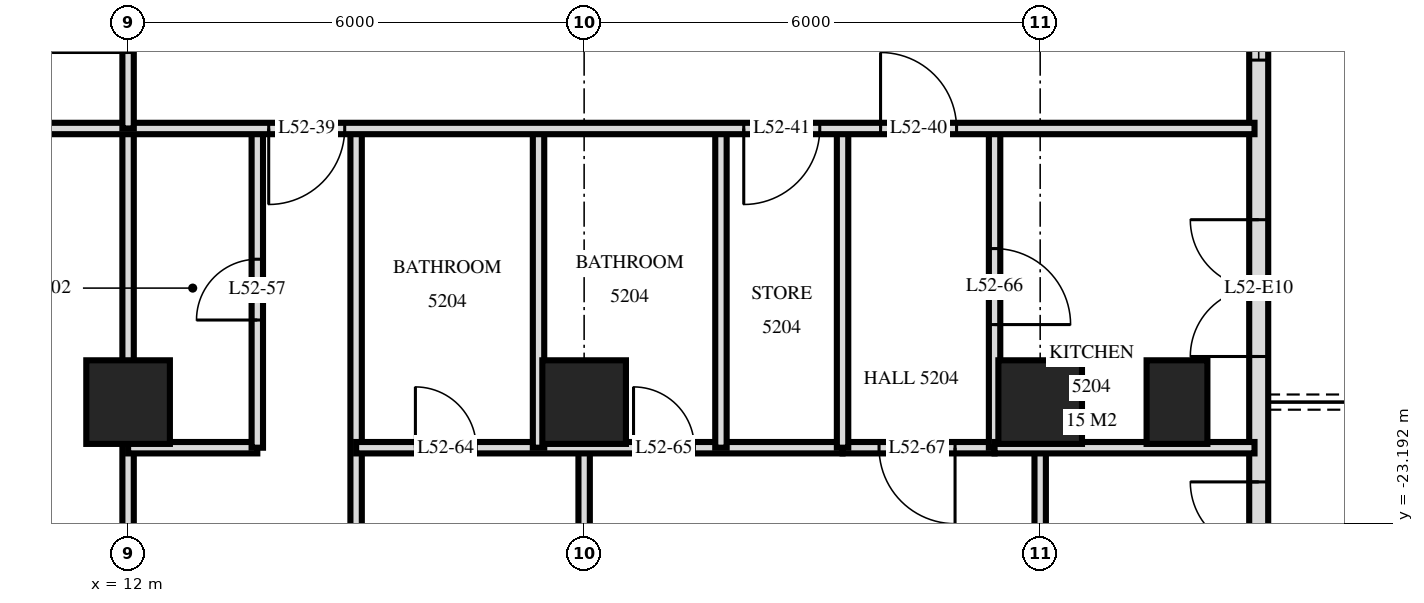
"""IFC4 building model, lengths in metres.
Left out: names, types, materials, properties, quantities, classifications, styles, units other than length and angle.
Written with IfcOpenShell. Run it as: python <this file> out.ifc"""

import sys

from ifc_helpers import new_model, si_unit, direction, frame, frame_2d, origin, origin_2d, place, context, subcontext, project, spatial, rectangle, extrude, element, fill, save


model = new_model("IFC4")
c1 = context("Model", 3, precision=1e-05, world=origin(), true_north=direction((0.0, 1.0)))
c2 = subcontext(c1, "Body", "Model", "MODEL_VIEW")
j1 = project(units=[si_unit("LENGTHUNIT", "METRE"), si_unit("PLANEANGLEUNIT", "RADIAN")], contexts=[c1])
p1 = place(None, origin())
s1 = spatial("IfcSite", under=j1, at=p1, CompositionType="ELEMENT")
p2 = place(p1, origin())
s2 = spatial("IfcBuilding", under=s1, at=p2, CompositionType="ELEMENT")
p3 = place(p2, frame((0.0, 0.0, 201.1)))
s3 = spatial("IfcBuildingStorey", under=s2, at=p3, CompositionType="ELEMENT", Elevation=201.1)
for number, where, z_axis, x_axis in (
    (1, (12.0, -21.6, 0.0), (0.0, 0.0, 1.0), (1.0, 0.0, 0.0)),
    (2, (18.0, -21.6, 0.0), (0.0, 0.0, 1.0), (1.0, 0.0, 0.0)),
    (3, (24.0, -21.6, 0.0), (0.0, 0.0, 1.0), (1.0, 0.0, 0.0)),
):
    element("IfcColumn", number, at=place(p3, frame(where, z_axis=z_axis, x_axis=x_axis)), inside=s3, PredefinedType="COLUMN", context=c2, shape_type="SweptSolid", body=[
        extrude(rectangle(XDim=1.1, YDim=1.1, at=origin_2d()), origin(), (0.0, 0.0, 1.0), 3.5),
    ])
p4 = place(p3, frame((25.8, -21.6, 0.0), z_axis=(0.0, 0.0, 1.0), x_axis=(0.0, 1.0, 0.0)))
e4 = element("IfcColumn", 4, at=p4, inside=s3, PredefinedType="COLUMN", context=c2, shape_type="SweptSolid", body=[
    extrude(rectangle(XDim=1.1, YDim=0.8, at=origin_2d()), origin(), (0.0, 0.0, 1.0), 3.5),
])
p5 = place(p3, frame((26.875, -24.875, 0.0), z_axis=(0.0, 0.0, 1.0), x_axis=(0.0, 1.0, 0.0)))
e5 = element("IfcWall", 5, at=p5, inside=s3, PredefinedType="SOLIDWALL", context=c2, shape_type="SweptSolid", body=[
    extrude(rectangle(XDim=21.551, YDim=0.25, at=frame_2d((10.775, 0.0))), origin(), (0.0, 0.0, 1.0), 3.22),
])
p6 = place(p5, frame((0.425, 0.0, 0.0)))
e6 = element("IfcOpeningElement", 6, at=p6, cuts=e5, PredefinedType="OPENING", context=c2, shape_type="SweptSolid", body=[
    extrude(rectangle(XDim=1.8, YDim=2.4, at=frame_2d((0.9, 1.2))), frame((0.0, 0.135, 0.0), z_axis=(0.0, -1.0, 0.0), x_axis=(1.0, 0.0, 0.0)), (0.0, 0.0, 1.0), 0.27),
])
p7 = place(p5, frame((3.875, 0.0, 0.0)))
e7 = element("IfcOpeningElement", 7, at=p7, cuts=e5, PredefinedType="OPENING", context=c2, shape_type="SweptSolid", body=[
    extrude(rectangle(XDim=1.8, YDim=2.4, at=frame_2d((0.9, 1.2))), frame((0.0, 0.135, 0.0), z_axis=(0.0, -1.0, 0.0), x_axis=(1.0, 0.0, 0.0)), (0.0, 0.0, 1.0), 0.27),
])
p8 = place(p5, frame((7.775, 0.0, 0.9)))
e8 = element("IfcOpeningElement", 8, at=p8, cuts=e5, PredefinedType="OPENING", context=c2, shape_type="SweptSolid", body=[
    extrude(rectangle(XDim=1.2, YDim=1.5, at=frame_2d((0.6, 0.75))), frame((0.0, 0.135, 0.0), z_axis=(0.0, -1.0, 0.0), x_axis=(1.0, 0.0, 0.0)), (0.0, 0.0, 1.0), 0.27),
])
p9 = place(p5, frame((11.975, 0.0, 0.0)))
e9 = element("IfcOpeningElement", 9, at=p9, cuts=e5, PredefinedType="OPENING", context=c2, shape_type="SweptSolid", body=[
    extrude(rectangle(XDim=1.8, YDim=2.4, at=frame_2d((0.9, 1.2))), frame((0.0, 0.135, 0.0), z_axis=(0.0, -1.0, 0.0), x_axis=(1.0, 0.0, 0.0)), (0.0, 0.0, 1.0), 0.27),
])
p10 = place(p3, frame((24.0, -28.918, 0.0), z_axis=(0.0, 0.0, 1.0), x_axis=(0.0, 1.0, 0.0)))
e10 = element("IfcWall", 10, at=p10, inside=s3, PredefinedType="PARTITIONING", context=c2, shape_type="SweptSolid", body=[
    extrude(rectangle(XDim=6.718, YDim=0.15, at=frame_2d((3.359, 0.0))), origin(), (0.0, 0.0, 1.0), 3.22),
])
p11 = place(p10, frame((2.948, 0.0, 0.0)))
e11 = element("IfcOpeningElement", 11, at=p11, cuts=e10, PredefinedType="OPENING", context=c2, shape_type="SweptSolid", body=[
    extrude(rectangle(XDim=0.9, YDim=2.1, at=frame_2d((0.45, 1.05))), frame((0.0, 0.085, 0.0), z_axis=(0.0, -1.0, 0.0), x_axis=(1.0, 0.0, 0.0)), (0.0, 0.0, 1.0), 0.17),
])
p12 = place(p3, frame((23.4, -22.2, 0.0), z_axis=(0.0, 0.0, 1.0), x_axis=(0.0, 1.0, 0.0)))
e12 = element("IfcWall", 12, at=p12, inside=s3, PredefinedType="PARTITIONING", context=c2, shape_type="SweptSolid", body=[
    extrude(rectangle(XDim=4.2, YDim=0.15, at=frame_2d((2.1, 0.0))), origin(), (0.0, 0.0, 1.0), 3.22),
])
p13 = place(p12, frame((1.62, 0.0, 0.0)))
e13 = element("IfcOpeningElement", 13, at=p13, cuts=e12, PredefinedType="OPENING", context=c2, shape_type="SweptSolid", body=[
    extrude(rectangle(XDim=1.0, YDim=2.1, at=frame_2d((0.5, 1.05))), frame((0.0, 0.085, 0.0), z_axis=(0.0, -1.0, 0.0), x_axis=(1.0, 0.0, 0.0)), (0.0, 0.0, 1.0), 0.17),
])
for number, where, z_axis, x_axis in (
    (14, (21.4, -22.2, 0.0), (0.0, 0.0, 1.0), (0.0, 1.0, 0.0)),
    (15, (19.8, -22.2, 0.0), (0.0, 0.0, 1.0), (0.0, 1.0, 0.0)),
):
    element("IfcWall", number, at=place(p3, frame(where, z_axis=z_axis, x_axis=x_axis)), inside=s3, PredefinedType="PARTITIONING", context=c2, shape_type="SweptSolid", body=[
        extrude(rectangle(XDim=4.2, YDim=0.15, at=frame_2d((2.1, 0.0))), origin(), (0.0, 0.0, 1.0), 3.22),
    ])
p14 = place(p3, frame((18.0, -29.22, 0.0), z_axis=(0.0, 0.0, 1.0), x_axis=(0.0, 1.0, 0.0)))
e16 = element("IfcWall", 16, at=p14, inside=s3, PredefinedType="PARTITIONING", context=c2, shape_type="SweptSolid", body=[
    extrude(rectangle(XDim=7.02, YDim=0.15, at=frame_2d((3.51, 0.0))), origin(), (0.0, 0.0, 1.0), 3.22),
])
p15 = place(p14, frame((2.99, 0.0, 0.0)))
e17 = element("IfcOpeningElement", 17, at=p15, cuts=e16, PredefinedType="OPENING", context=c2, shape_type="SweptSolid", body=[
    extrude(rectangle(XDim=0.9, YDim=2.1, at=frame_2d((0.45, 1.05))), frame((0.0, 0.085, 0.0), z_axis=(0.0, -1.0, 0.0), x_axis=(1.0, 0.0, 0.0)), (0.0, 0.0, 1.0), 0.17),
])
p16 = place(p3, frame((17.4, -22.2, 0.0), z_axis=(0.0, 0.0, 1.0), x_axis=(0.0, 1.0, 0.0)))
e18 = element("IfcWall", 18, at=p16, inside=s3, PredefinedType="PARTITIONING", context=c2, shape_type="SweptSolid", body=[
    extrude(rectangle(XDim=4.2, YDim=0.15, at=frame_2d((2.1, 0.0))), origin(), (0.0, 0.0, 1.0), 3.22),
])
p17 = place(p3, frame((15.0, -29.22, 0.0), z_axis=(0.0, 0.0, 1.0), x_axis=(0.0, 1.0, 0.0)))
e19 = element("IfcWall", 19, at=p17, inside=s3, PredefinedType="PARTITIONING", context=c2, shape_type="SweptSolid", body=[
    extrude(rectangle(XDim=11.22, YDim=0.15, at=frame_2d((5.61, 0.0))), origin(), (0.0, 0.0, 1.0), 3.22),
])
p18 = place(p3, frame((13.7, -22.2, 0.0), z_axis=(0.0, 0.0, 1.0), x_axis=(0.0, 1.0, 0.0)))
e20 = element("IfcWall", 20, at=p18, inside=s3, PredefinedType="PARTITIONING", context=c2, shape_type="SweptSolid", body=[
    extrude(rectangle(XDim=4.2, YDim=0.15, at=frame_2d((2.1, 0.0))), origin(), (0.0, 0.0, 1.0), 3.22),
])
p19 = place(p18, frame((1.68, 0.0, 0.0)))
e21 = element("IfcOpeningElement", 21, at=p19, cuts=e20, PredefinedType="OPENING", context=c2, shape_type="SweptSolid", body=[
    extrude(rectangle(XDim=0.8, YDim=2.1, at=frame_2d((0.4, 1.05))), frame((0.0, 0.085, 0.0), z_axis=(0.0, -1.0, 0.0), x_axis=(1.0, 0.0, 0.0)), (0.0, 0.0, 1.0), 0.17),
])
p20 = place(p3, frame((12.0, -18.0, 0.0), z_axis=(0.0, 0.0, 1.0), x_axis=(0.0, 1.0, 0.0)))
e22 = element("IfcWall", 22, at=p20, inside=s3, PredefinedType="PARTITIONING", context=c2, shape_type="SweptSolid", body=[
    extrude(rectangle(XDim=2.95, YDim=0.15, at=frame_2d((1.475, 0.0))), origin(), (0.0, 0.0, 1.0), 3.22),
])
p21 = place(p20, frame((1.0, 0.0, 0.0)))
e23 = element("IfcOpeningElement", 23, at=p21, cuts=e22, PredefinedType="OPENING", context=c2, shape_type="SweptSolid", body=[
    extrude(rectangle(XDim=1.0, YDim=2.1, at=frame_2d((0.5, 1.05))), frame((0.0, 0.085, 0.0), z_axis=(0.0, -1.0, 0.0), x_axis=(1.0, 0.0, 0.0)), (0.0, 0.0, 1.0), 0.17),
])
p22 = place(p3, frame((12.0, -29.22, 0.0), z_axis=(0.0, 0.0, 1.0), x_axis=(0.0, 1.0, 0.0)))
e24 = element("IfcWall", 24, at=p22, inside=s3, PredefinedType="PARTITIONING", context=c2, shape_type="SweptSolid", body=[
    extrude(rectangle(XDim=11.22, YDim=0.15, at=frame_2d((5.61, 0.0))), origin(), (0.0, 0.0, 1.0), 3.22),
])
p23 = place(p3, frame((21.4, -22.2, 0.0), z_axis=(0.0, 0.0, 1.0), x_axis=(1.0, 0.0, 0.0)))
e25 = element("IfcWall", 25, at=p23, inside=s3, PredefinedType="PARTITIONING", context=c2, shape_type="SweptSolid", body=[
    extrude(rectangle(XDim=2.0, YDim=0.15, at=frame_2d((1.0, 0.0))), origin(), (0.0, 0.0, 1.0), 3.22),
])
p24 = place(p23, frame((0.48, 0.0, 0.0)))
e26 = element("IfcOpeningElement", 26, at=p24, cuts=e25, PredefinedType="OPENING", context=c2, shape_type="SweptSolid", body=[
    extrude(rectangle(XDim=1.0, YDim=2.1, at=frame_2d((0.5, 1.05))), frame((0.0, 0.085, 0.0), z_axis=(0.0, -1.0, 0.0), x_axis=(1.0, 0.0, 0.0)), (0.0, 0.0, 1.0), 0.17),
])
p25 = place(p3, frame((12.0, -22.2, 0.0), z_axis=(0.0, 0.0, 1.0), x_axis=(1.0, 0.0, 0.0)))
e27 = element("IfcWall", 27, at=p25, inside=s3, PredefinedType="PARTITIONING", context=c2, shape_type="SweptSolid", body=[
    extrude(rectangle(XDim=1.7, YDim=0.15, at=frame_2d((0.85, 0.0))), origin(), (0.0, 0.0, 1.0), 3.22),
])
p26 = place(p3, frame((15.0, -22.2, 0.0), z_axis=(0.0, 0.0, 1.0), x_axis=(1.0, 0.0, 0.0)))
e28 = element("IfcWall", 28, at=p26, inside=s3, PredefinedType="PARTITIONING", context=c2, shape_type="SweptSolid", body=[
    extrude(rectangle(XDim=6.4, YDim=0.15, at=frame_2d((3.2, 0.0))), origin(), (0.0, 0.0, 1.0), 3.22),
])
p27 = place(p26, frame((0.78, 0.0, 0.0)))
e29 = element("IfcOpeningElement", 29, at=p27, cuts=e28, PredefinedType="OPENING", context=c2, shape_type="SweptSolid", body=[
    extrude(rectangle(XDim=0.8, YDim=2.1, at=frame_2d((0.4, 1.05))), frame((0.0, 0.085, 0.0), z_axis=(0.0, -1.0, 0.0), x_axis=(1.0, 0.0, 0.0)), (0.0, 0.0, 1.0), 0.17),
])
p28 = place(p26, frame((3.65, 0.0, 0.0)))
e30 = element("IfcOpeningElement", 30, at=p28, cuts=e28, PredefinedType="OPENING", context=c2, shape_type="SweptSolid", body=[
    extrude(rectangle(XDim=0.8, YDim=2.1, at=frame_2d((0.4, 1.05))), frame((0.0, 0.085, 0.0), z_axis=(0.0, -1.0, 0.0), x_axis=(1.0, 0.0, 0.0)), (0.0, 0.0, 1.0), 0.17),
])
p29 = place(p3, frame((23.4, -22.2, 0.0), z_axis=(0.0, 0.0, 1.0), x_axis=(1.0, 0.0, 0.0)))
e31 = element("IfcWall", 31, at=p29, inside=s3, PredefinedType="PARTITIONING", context=c2, shape_type="SweptSolid", body=[
    extrude(rectangle(XDim=3.42, YDim=0.15, at=frame_2d((1.71, 0.0))), origin(), (0.0, 0.0, 1.0), 3.22),
])
p30 = place(p3, frame((-26.82, -18.0, 0.0), z_axis=(0.0, 0.0, 1.0), x_axis=(1.0, 0.0, 0.0)))
e32 = element("IfcWall", 32, at=p30, inside=s3, PredefinedType="PARTITIONING", context=c2, shape_type="SweptSolid", body=[
    extrude(rectangle(XDim=53.64, YDim=0.15, at=frame_2d((26.82, 0.0))), origin(), (0.0, 0.0, 1.0), 3.22),
])
p31 = place(p30, frame((11.97, 0.0, 0.0)))
e33 = element("IfcOpeningElement", 33, at=p31, cuts=e32, PredefinedType="OPENING", context=c2, shape_type="SweptSolid", body=[
    extrude(rectangle(XDim=1.0, YDim=2.1, at=frame_2d((0.5, 1.05))), frame((0.0, 0.085, 0.0), z_axis=(0.0, -1.0, 0.0), x_axis=(1.0, 0.0, 0.0)), (0.0, 0.0, 1.0), 0.17),
])
p32 = place(p30, frame((3.92, 0.0, 0.0)))
e34 = element("IfcOpeningElement", 34, at=p32, cuts=e32, PredefinedType="OPENING", context=c2, shape_type="SweptSolid", body=[
    extrude(rectangle(XDim=1.0, YDim=2.1, at=frame_2d((0.5, 1.05))), frame((0.0, 0.085, 0.0), z_axis=(0.0, -1.0, 0.0), x_axis=(1.0, 0.0, 0.0)), (0.0, 0.0, 1.0), 0.17),
])
p33 = place(p30, frame((5.72, 0.0, 0.0)))
e35 = element("IfcOpeningElement", 35, at=p33, cuts=e32, PredefinedType="OPENING", context=c2, shape_type="SweptSolid", body=[
    extrude(rectangle(XDim=1.0, YDim=2.1, at=frame_2d((0.5, 1.05))), frame((0.0, 0.085, 0.0), z_axis=(0.0, -1.0, 0.0), x_axis=(1.0, 0.0, 0.0)), (0.0, 0.0, 1.0), 0.17),
])
p34 = place(p30, frame((40.67, 0.0, 0.0)))
e36 = element("IfcOpeningElement", 36, at=p34, cuts=e32, PredefinedType="OPENING", context=c2, shape_type="SweptSolid", body=[
    extrude(rectangle(XDim=1.0, YDim=2.1, at=frame_2d((0.5, 1.05))), frame((0.0, 0.085, 0.0), z_axis=(0.0, -1.0, 0.0), x_axis=(1.0, 0.0, 0.0)), (0.0, 0.0, 1.0), 0.17),
])
p35 = place(p30, frame((48.72, 0.0, 0.0)))
e37 = element("IfcOpeningElement", 37, at=p35, cuts=e32, PredefinedType="OPENING", context=c2, shape_type="SweptSolid", body=[
    extrude(rectangle(XDim=1.0, YDim=2.1, at=frame_2d((0.5, 1.05))), frame((0.0, 0.085, 0.0), z_axis=(0.0, -1.0, 0.0), x_axis=(1.0, 0.0, 0.0)), (0.0, 0.0, 1.0), 0.17),
])
p36 = place(p30, frame((46.92, 0.0, 0.0)))
e38 = element("IfcOpeningElement", 38, at=p36, cuts=e32, PredefinedType="OPENING", context=c2, shape_type="SweptSolid", body=[
    extrude(rectangle(XDim=1.0, YDim=2.1, at=frame_2d((0.5, 1.05))), frame((0.0, 0.085, 0.0), z_axis=(0.0, -1.0, 0.0), x_axis=(1.0, 0.0, 0.0)), (0.0, 0.0, 1.0), 0.17),
])
p37 = place(p30, frame((17.32, 0.0, 0.0)))
e39 = element("IfcOpeningElement", 39, at=p37, cuts=e32, PredefinedType="OPENING", context=c2, shape_type="SweptSolid", body=[
    extrude(rectangle(XDim=1.0, YDim=2.1, at=frame_2d((0.5, 1.05))), frame((0.0, 0.085, 0.0), z_axis=(0.0, -1.0, 0.0), x_axis=(1.0, 0.0, 0.0)), (0.0, 0.0, 1.0), 0.17),
])
p38 = place(p30, frame((23.32, 0.0, 0.0)))
e40 = element("IfcOpeningElement", 40, at=p38, cuts=e32, PredefinedType="OPENING", context=c2, shape_type="SweptSolid", body=[
    extrude(rectangle(XDim=1.0, YDim=2.1, at=frame_2d((0.5, 1.05))), frame((0.0, 0.085, 0.0), z_axis=(0.0, -1.0, 0.0), x_axis=(1.0, 0.0, 0.0)), (0.0, 0.0, 1.0), 0.17),
])
p39 = place(p30, frame((29.32, 0.0, 0.0)))
e41 = element("IfcOpeningElement", 41, at=p39, cuts=e32, PredefinedType="OPENING", context=c2, shape_type="SweptSolid", body=[
    extrude(rectangle(XDim=1.0, YDim=2.1, at=frame_2d((0.5, 1.05))), frame((0.0, 0.085, 0.0), z_axis=(0.0, -1.0, 0.0), x_axis=(1.0, 0.0, 0.0)), (0.0, 0.0, 1.0), 0.17),
])
p40 = place(p30, frame((35.32, 0.0, 0.0)))
e42 = element("IfcOpeningElement", 42, at=p40, cuts=e32, PredefinedType="OPENING", context=c2, shape_type="SweptSolid", body=[
    extrude(rectangle(XDim=1.0, YDim=2.1, at=frame_2d((0.5, 1.05))), frame((0.0, 0.085, 0.0), z_axis=(0.0, -1.0, 0.0), x_axis=(1.0, 0.0, 0.0)), (0.0, 0.0, 1.0), 0.17),
])
p41 = place(p6, origin())
e43 = element("IfcDoor", 43, at=p41, inside=s3, OperationType="DOUBLE_DOOR_SINGLE_SWING", PredefinedType="DOOR", context=c2, shape_type="SweptSolid", body=[
    extrude(rectangle(XDim=1.8, YDim=2.4, at=frame_2d((0.9, 1.2))), frame((0.0, 0.025, 0.0), z_axis=(0.0, -1.0, 0.0), x_axis=(1.0, 0.0, 0.0)), (0.0, 0.0, 1.0), 0.05),
])
fill(e6, e43)
p42 = place(p7, origin())
e44 = element("IfcDoor", 44, at=p42, inside=s3, OperationType="DOUBLE_DOOR_SINGLE_SWING", PredefinedType="DOOR", context=c2, shape_type="SweptSolid", body=[
    extrude(rectangle(XDim=1.8, YDim=2.4, at=frame_2d((0.9, 1.2))), frame((0.0, 0.025, 0.0), z_axis=(0.0, -1.0, 0.0), x_axis=(1.0, 0.0, 0.0)), (0.0, 0.0, 1.0), 0.05),
])
fill(e7, e44)
p43 = place(p8, origin())
e45 = element("IfcWindow", 45, at=p43, inside=s3, PartitioningType="SINGLE_PANEL", PredefinedType="WINDOW", context=c2, shape_type="SweptSolid", body=[
    extrude(rectangle(XDim=1.2, YDim=1.5, at=frame_2d((0.6, 0.75))), frame((0.0, 0.03, 0.0), z_axis=(0.0, -1.0, 0.0), x_axis=(1.0, 0.0, 0.0)), (0.0, 0.0, 1.0), 0.06),
])
fill(e8, e45)
p44 = place(p34, frame((0.5, 0.0, 0.0), z_axis=(0.0, 0.0, 1.0), x_axis=(-1.0, 0.0, 0.0)))
e46 = element("IfcDoor", 46, at=p44, inside=s3, OperationType="SINGLE_SWING_LEFT", PredefinedType="DOOR", context=c2, shape_type="SweptSolid", body=[
    extrude(rectangle(XDim=1.0, YDim=2.1, at=frame_2d((0.0, 1.05))), frame((0.0, -0.025, 0.0), z_axis=(0.0, 1.0, 0.0), x_axis=(-1.0, 0.0, 0.0)), (0.0, 0.0, 1.0), 0.05),
])
fill(e36, e46)
p45 = place(p35, origin())
e47 = element("IfcDoor", 47, at=p45, inside=s3, OperationType="SINGLE_SWING_RIGHT", PredefinedType="DOOR", context=c2, shape_type="SweptSolid", body=[
    extrude(rectangle(XDim=1.0, YDim=2.1, at=frame_2d((0.5, 1.05))), frame((0.0, 0.025, 0.0), z_axis=(0.0, -1.0, 0.0), x_axis=(1.0, 0.0, 0.0)), (0.0, 0.0, 1.0), 0.05),
])
fill(e37, e47)
p46 = place(p36, frame((0.5, 0.0, 0.0), z_axis=(0.0, 0.0, 1.0), x_axis=(-1.0, 0.0, 0.0)))
e48 = element("IfcDoor", 48, at=p46, inside=s3, OperationType="SINGLE_SWING_LEFT", PredefinedType="DOOR", context=c2, shape_type="SweptSolid", body=[
    extrude(rectangle(XDim=1.0, YDim=2.1, at=frame_2d((0.0, 1.05))), frame((0.0, -0.025, 0.0), z_axis=(0.0, 1.0, 0.0), x_axis=(-1.0, 0.0, 0.0)), (0.0, 0.0, 1.0), 0.05),
])
fill(e38, e48)
p47 = place(p19, origin())
e49 = element("IfcDoor", 49, at=p47, inside=s3, OperationType="SINGLE_SWING_RIGHT", PredefinedType="DOOR", context=c2, shape_type="SweptSolid", body=[
    extrude(rectangle(XDim=0.8, YDim=2.1, at=frame_2d((0.4, 1.05))), frame((0.0, 0.025, 0.0), z_axis=(0.0, -1.0, 0.0), x_axis=(1.0, 0.0, 0.0)), (0.0, 0.0, 1.0), 0.05),
])
fill(e21, e49)
p48 = place(p27, origin())
e50 = element("IfcDoor", 50, at=p48, inside=s3, OperationType="SINGLE_SWING_RIGHT", PredefinedType="DOOR", context=c2, shape_type="SweptSolid", body=[
    extrude(rectangle(XDim=0.8, YDim=2.1, at=frame_2d((0.4, 1.05))), frame((0.0, 0.025, 0.0), z_axis=(0.0, -1.0, 0.0), x_axis=(1.0, 0.0, 0.0)), (0.0, 0.0, 1.0), 0.05),
])
fill(e29, e50)
p49 = place(p28, origin())
e51 = element("IfcDoor", 51, at=p49, inside=s3, OperationType="SINGLE_SWING_RIGHT", PredefinedType="DOOR", context=c2, shape_type="SweptSolid", body=[
    extrude(rectangle(XDim=0.8, YDim=2.1, at=frame_2d((0.4, 1.05))), frame((0.0, 0.025, 0.0), z_axis=(0.0, -1.0, 0.0), x_axis=(1.0, 0.0, 0.0)), (0.0, 0.0, 1.0), 0.05),
])
fill(e30, e51)
p50 = place(p13, frame((0.5, 0.0, 0.0), z_axis=(0.0, 0.0, 1.0), x_axis=(-1.0, 0.0, 0.0)))
e52 = element("IfcDoor", 52, at=p50, inside=s3, OperationType="SINGLE_SWING_LEFT", PredefinedType="DOOR", context=c2, shape_type="SweptSolid", body=[
    extrude(rectangle(XDim=1.0, YDim=2.1, at=frame_2d((0.0, 1.05))), frame((0.0, -0.025, 0.0), z_axis=(0.0, 1.0, 0.0), x_axis=(-1.0, 0.0, 0.0)), (0.0, 0.0, 1.0), 0.05),
])
fill(e13, e52)
p51 = place(p24, frame((0.5, 0.0, 0.0), z_axis=(0.0, 0.0, 1.0), x_axis=(-1.0, 0.0, 0.0)))
e53 = element("IfcDoor", 53, at=p51, inside=s3, OperationType="SINGLE_SWING_RIGHT", PredefinedType="DOOR", context=c2, shape_type="SweptSolid", body=[
    extrude(rectangle(XDim=1.0, YDim=2.1, at=frame_2d((0.0, 1.05))), frame((0.0, -0.025, 0.0), z_axis=(0.0, 1.0, 0.0), x_axis=(-1.0, 0.0, 0.0)), (0.0, 0.0, 1.0), 0.05),
])
fill(e26, e53)
save(model, sys.argv[1])
